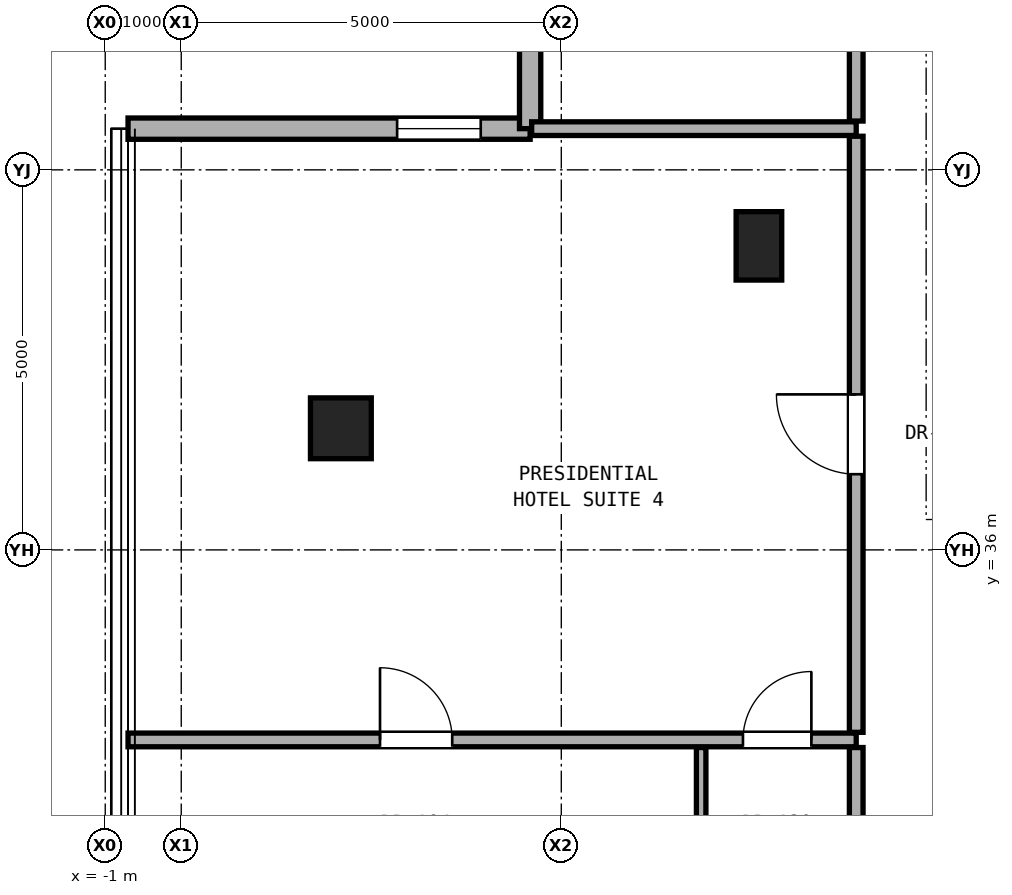
"""IFC4 building model, lengths in metres.
Left out: names, types, materials, properties, quantities, classifications, styles, units other than length and angle.
Written with IfcOpenShell. Run it as: python <this file> out.ifc"""

import sys

from ifc_helpers import new_model, si_unit, direction, frame, frame_2d, origin, origin_2d, place, context, subcontext, project, spatial, rectangle, hollow_rectangle, extrude, element, fill, save


model = new_model("IFC4")
c1 = context("Model", 3, precision=1e-05, world=origin(), true_north=direction((0.0, 1.0)))
c2 = subcontext(c1, "Body", "Model", "MODEL_VIEW")
j1 = project(units=[si_unit("LENGTHUNIT", "METRE"), si_unit("PLANEANGLEUNIT", "RADIAN")], contexts=[c1])
p1 = place(None, origin())
s1 = spatial("IfcSite", under=j1, at=p1, CompositionType="ELEMENT")
p2 = place(p1, origin())
s2 = spatial("IfcBuilding", under=s1, at=p2, CompositionType="ELEMENT")
p3 = place(p2, frame((0.0, 0.0, 232.6)))
s3 = spatial("IfcBuildingStorey", under=s2, at=p3, CompositionType="ELEMENT", Elevation=232.6)
p4 = place(p3, frame((2.1, 37.6, 0.0), z_axis=(0.0, 0.0, 1.0), x_axis=(1.0, 0.0, 0.0)))
e1 = element("IfcColumn", 1, at=p4, inside=s3, PredefinedType="COLUMN", context=c2, shape_type="SweptSolid", body=[
    extrude(hollow_rectangle(XDim=0.8, YDim=0.8, WallThickness=0.045, at=origin_2d()), origin(), (0.0, 0.0, 1.0), 3.3),
])
p5 = place(p3, frame((7.6, 40.0, 0.0), z_axis=(0.0, 0.0, 1.0), x_axis=(1.0, 0.0, 0.0)))
e2 = element("IfcColumn", 2, at=p5, inside=s3, PredefinedType="PILASTER", context=c2, shape_type="SweptSolid", body=[
    extrude(rectangle(XDim=0.6, YDim=0.9, at=origin_2d()), origin(), (0.0, 0.0, 1.0), 3.3),
])
p6 = place(p3, frame((4.59, 41.542, 0.0), z_axis=(0.0, 0.0, 1.0), x_axis=(-1.0, 0.0, 0.0)))
e3 = element("IfcWall", 3, at=p6, inside=s3, PredefinedType="SOLIDWALL", context=c2, shape_type="SweptSolid", body=[
    extrude(rectangle(XDim=5.29, YDim=0.28, at=frame_2d((2.645, 0.0))), origin(), (0.0, 0.0, 1.0), 3.08),
])
p7 = place(p6, frame((0.65, 0.0, 0.85)))
e4 = element("IfcOpeningElement", 4, at=p7, cuts=e3, PredefinedType="OPENING", context=c2, shape_type="SweptSolid", body=[
    extrude(rectangle(XDim=1.1, YDim=2.0, at=frame_2d((0.55, 1.0))), frame((0.0, 0.15, 0.0), z_axis=(0.0, -1.0, 0.0), x_axis=(1.0, 0.0, 0.0)), (0.0, 0.0, 1.0), 0.3),
])
p8 = place(p3, frame((4.59, 46.832, 0.0), z_axis=(0.0, 0.0, 1.0), x_axis=(0.0, -1.0, 0.0)))
e5 = element("IfcWall", 5, at=p8, inside=s3, PredefinedType="SOLIDWALL", context=c2, shape_type="SweptSolid", body=[
    extrude(rectangle(XDim=5.29, YDim=0.28, at=frame_2d((2.645, 0.0))), origin(), (0.0, 0.0, 1.0), 3.08),
])
p9 = place(p3, frame((-0.7, 33.5, 0.0), z_axis=(0.0, 0.0, 1.0), x_axis=(1.0, 0.0, 0.0)))
e6 = element("IfcWall", 6, at=p9, inside=s3, PredefinedType="PARTITIONING", context=c2, shape_type="SweptSolid", body=[
    extrude(rectangle(XDim=9.58, YDim=0.18, at=frame_2d((4.79, 0.0))), origin(), (0.0, 0.0, 1.0), 2.319),
])
p10 = place(p9, frame((3.315, 0.0, 0.0)))
e7 = element("IfcOpeningElement", 7, at=p10, cuts=e6, PredefinedType="OPENING", context=c2, shape_type="SweptSolid", body=[
    extrude(rectangle(XDim=0.95, YDim=2.15, at=frame_2d((0.475, 1.075))), frame((0.0, 0.1, 0.0), z_axis=(0.0, -1.0, 0.0), x_axis=(1.0, 0.0, 0.0)), (0.0, 0.0, 1.0), 0.2),
])
p11 = place(p9, frame((8.09, 0.0, 0.0)))
e8 = element("IfcOpeningElement", 8, at=p11, cuts=e6, PredefinedType="OPENING", context=c2, shape_type="SweptSolid", body=[
    extrude(rectangle(XDim=0.9, YDim=2.1, at=frame_2d((0.45, 1.05))), frame((0.0, 0.1, 0.0), z_axis=(0.0, -1.0, 0.0), x_axis=(1.0, 0.0, 0.0)), (0.0, 0.0, 1.0), 0.2),
])
p12 = place(p3, frame((4.61, 41.542, 0.0), z_axis=(0.0, 0.0, 1.0), x_axis=(1.0, 0.0, 0.0)))
e9 = element("IfcWall", 9, at=p12, inside=s3, PredefinedType="PARTITIONING", context=c2, shape_type="SweptSolid", body=[
    extrude(rectangle(XDim=4.27, YDim=0.18, at=frame_2d((2.135, 0.0))), origin(), (0.0, 0.0, 1.0), 3.1),
])
p13 = place(p3, frame((6.84, 31.272, 0.0), z_axis=(0.0, 0.0, 1.0), x_axis=(0.0, 1.0, 0.0)))
e10 = element("IfcWall", 10, at=p13, inside=s3, PredefinedType="PARTITIONING", context=c2, shape_type="SweptSolid", body=[
    extrude(rectangle(XDim=2.127, YDim=0.125, at=frame_2d((1.064, 0.0))), origin(), (0.0, 0.0, 1.0), 2.396),
])
p14 = place(p3, frame((8.88, 31.272, 0.0), z_axis=(0.0, 0.0, 1.0), x_axis=(0.0, 1.0, 0.0)))
e11 = element("IfcWall", 11, at=p14, inside=s3, PredefinedType="PARTITIONING", context=c2, shape_type="SweptSolid", body=[
    extrude(rectangle(XDim=2.127, YDim=0.18, at=frame_2d((1.064, 0.0))), origin(), (0.0, 0.0, 1.0), 2.396),
])
p15 = place(p3, frame((8.88, 33.6, 0.0), z_axis=(0.0, 0.0, 1.0), x_axis=(0.0, 1.0, 0.0)))
e12 = element("IfcWall", 12, at=p15, inside=s3, PredefinedType="PARTITIONING", context=c2, shape_type="SweptSolid", body=[
    extrude(rectangle(XDim=7.842, YDim=0.18, at=frame_2d((3.921, 0.0))), origin(), (0.0, 0.0, 1.0), 2.492),
])
p16 = place(p15, frame((3.396, 0.0, 0.0)))
e13 = element("IfcOpeningElement", 13, at=p16, cuts=e12, PredefinedType="OPENING", context=c2, shape_type="SweptSolid", body=[
    extrude(rectangle(XDim=1.05, YDim=2.2, at=frame_2d((0.525, 1.1))), frame((0.0, 0.1, 0.0), z_axis=(0.0, -1.0, 0.0), x_axis=(1.0, 0.0, 0.0)), (0.0, 0.0, 1.0), 0.2),
])
p17 = place(p3, frame((8.88, 41.642, 0.0), z_axis=(0.0, 0.0, 1.0), x_axis=(0.0, 1.0, 0.0)))
e14 = element("IfcWall", 14, at=p17, inside=s3, PredefinedType="PARTITIONING", context=c2, shape_type="SweptSolid", body=[
    extrude(rectangle(XDim=5.19, YDim=0.18, at=frame_2d((2.595, 0.0))), origin(), (0.0, 0.0, 1.0), 3.1),
])
p18 = place(p17, frame((2.12, 0.0, 0.0)))
e15 = element("IfcOpeningElement", 15, at=p18, cuts=e14, PredefinedType="OPENING", context=c2, shape_type="SweptSolid", body=[
    extrude(rectangle(XDim=0.95, YDim=2.15, at=frame_2d((0.475, 1.075))), frame((0.0, 0.1, 0.0), z_axis=(0.0, -1.0, 0.0), x_axis=(1.0, 0.0, 0.0)), (0.0, 0.0, 1.0), 0.2),
])
p19 = place(p7, origin())
e16 = element("IfcWindow", 16, at=p19, inside=s3, PartitioningType="SINGLE_PANEL", PredefinedType="WINDOW", context=c2, shape_type="SweptSolid", body=[
    extrude(rectangle(XDim=1.1, YDim=2.0, at=frame_2d((0.55, 1.0))), frame((0.0, 0.03, 0.0), z_axis=(0.0, -1.0, 0.0), x_axis=(1.0, 0.0, 0.0)), (0.0, 0.0, 1.0), 0.06),
])
fill(e4, e16)
p20 = place(p16, origin())
e17 = element("IfcDoor", 17, at=p20, inside=s3, OperationType="SINGLE_SWING_RIGHT", PredefinedType="DOOR", context=c2, shape_type="SweptSolid", body=[
    extrude(rectangle(XDim=1.05, YDim=2.2, at=frame_2d((0.525, 1.1))), frame((0.0, 0.025, 0.0), z_axis=(0.0, -1.0, 0.0), x_axis=(1.0, 0.0, 0.0)), (0.0, 0.0, 1.0), 0.05),
])
fill(e13, e17)
p21 = place(p10, origin())
e18 = element("IfcDoor", 18, at=p21, inside=s3, OperationType="SINGLE_SWING_LEFT", PredefinedType="DOOR", context=c2, shape_type="SweptSolid", body=[
    extrude(rectangle(XDim=0.95, YDim=2.15, at=frame_2d((0.475, 1.075))), frame((0.0, 0.025, 0.0), z_axis=(0.0, -1.0, 0.0), x_axis=(1.0, 0.0, 0.0)), (0.0, 0.0, 1.0), 0.05),
])
fill(e7, e18)
p22 = place(p11, origin())
e19 = element("IfcDoor", 19, at=p22, inside=s3, OperationType="SINGLE_SWING_RIGHT", PredefinedType="DOOR", context=c2, shape_type="SweptSolid", body=[
    extrude(rectangle(XDim=0.9, YDim=2.1, at=frame_2d((0.45, 1.05))), frame((0.0, 0.025, 0.0), z_axis=(0.0, -1.0, 0.0), x_axis=(1.0, 0.0, 0.0)), (0.0, 0.0, 1.0), 0.05),
])
fill(e8, e19)
save(model, sys.argv[1])
